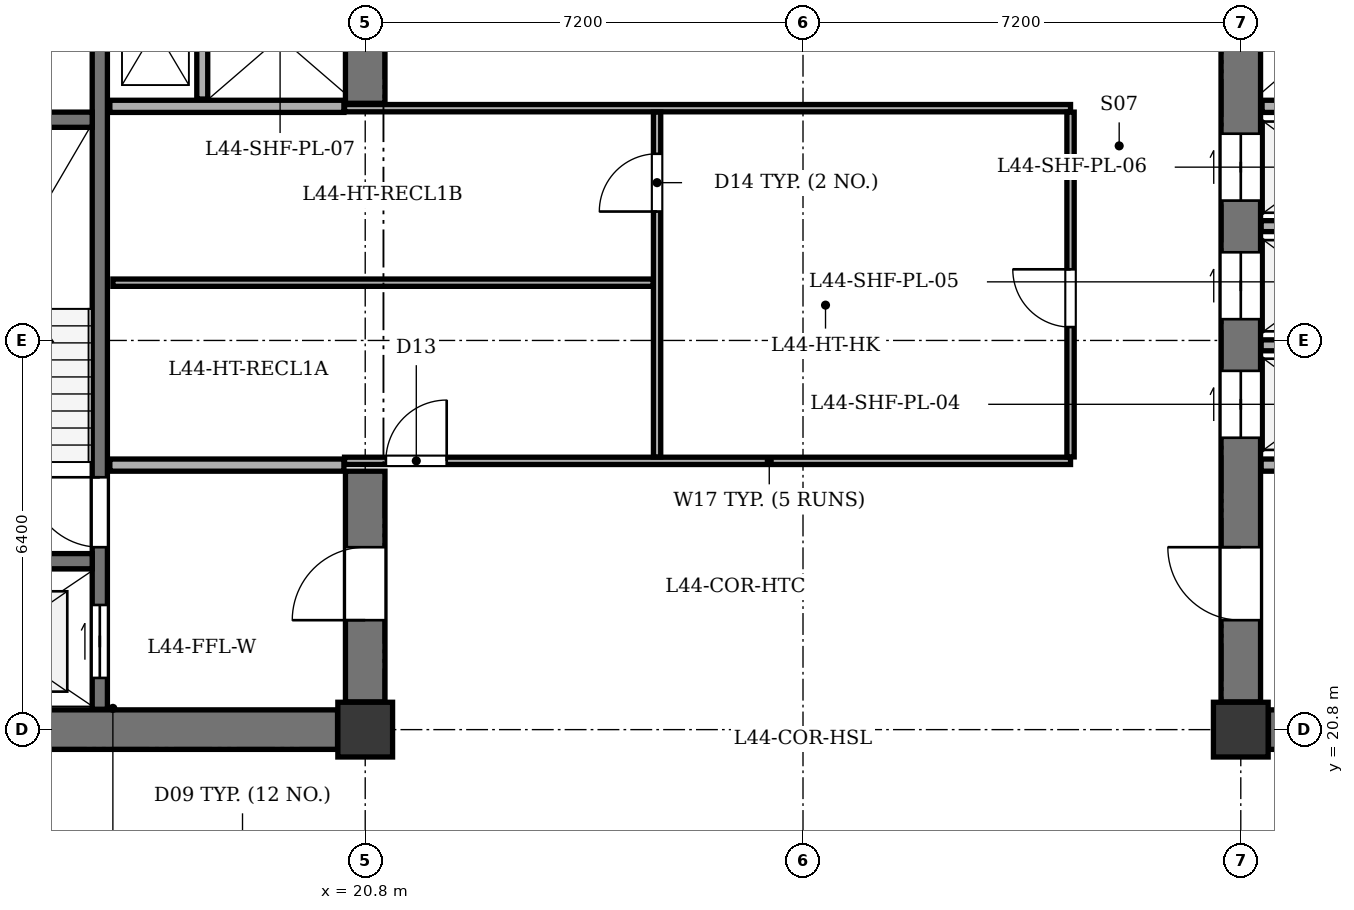
"""IFC4 building model, lengths in metres.
Left out: names, types, materials, properties, quantities, classifications, styles, units other than length and angle.
Written with IfcOpenShell. Run it as: python <this file> out.ifc"""

import sys

from ifc_helpers import new_model, si_unit, direction, frame, frame_2d, origin, origin_2d, place, context, subcontext, project, spatial, rectangle, extrude, element, fill, save


model = new_model("IFC4")
c1 = context("Model", 3, precision=1e-05, world=origin(), true_north=direction((0.0, 1.0)))
c2 = subcontext(c1, "Body", "Model", "MODEL_VIEW")
j1 = project(units=[si_unit("LENGTHUNIT", "METRE"), si_unit("PLANEANGLEUNIT", "RADIAN")], contexts=[c1])
p1 = place(None, origin())
s1 = spatial("IfcSite", under=j1, at=p1, CompositionType="ELEMENT")
p2 = place(p1, origin())
s2 = spatial("IfcBuilding", under=s1, at=p2, CompositionType="ELEMENT")
p3 = place(p2, frame((0.0, 0.0, 172.8)))
s3 = spatial("IfcBuildingStorey", under=s2, at=p3, CompositionType="ELEMENT", Elevation=172.8)
for number, where, z_axis, x_axis in (
    (1, (20.8, 20.8, 0.0), (0.0, 0.0, 1.0), (1.0, 0.0, 0.0)),
    (2, (35.2, 20.8, 0.0), (0.0, 0.0, 1.0), (1.0, 0.0, 0.0)),
):
    element("IfcColumn", number, at=place(p3, frame(where, z_axis=z_axis, x_axis=x_axis)), inside=s3, PredefinedType="COLUMN", context=c2, shape_type="SweptSolid", body=[
        extrude(rectangle(XDim=0.9, YDim=0.9, at=origin_2d()), origin(), (0.0, 0.0, 1.0), 3.5),
    ])
p4 = place(p3, frame((13.255, 20.8, 0.0), z_axis=(0.0, 0.0, 1.0), x_axis=(1.0, 0.0, 0.0)))
e3 = element("IfcWall", 3, at=p4, inside=s3, PredefinedType="SHEAR", context=c2, shape_type="SweptSolid", body=[
    extrude(rectangle(XDim=7.09, YDim=0.65, at=frame_2d((3.545, 0.0))), origin(), (0.0, 0.0, 1.0), 3.2),
])
p5 = place(p3, frame((20.8, 21.255, 0.0), z_axis=(0.0, 0.0, 1.0), x_axis=(0.0, 1.0, 0.0)))
e4 = element("IfcWall", 4, at=p5, inside=s3, PredefinedType="SHEAR", context=c2, shape_type="SweptSolid", body=[
    extrude(rectangle(XDim=3.795, YDim=0.65, at=frame_2d((1.897, 0.0))), origin(), (0.0, 0.0, 1.0), 3.2),
])
p6 = place(p5, frame((1.345, 0.0, 0.0)))
e5 = element("IfcOpeningElement", 5, at=p6, cuts=e4, PredefinedType="OPENING", context=c2, shape_type="SweptSolid", body=[
    extrude(rectangle(XDim=1.2, YDim=2.15, at=frame_2d((0.6, 1.075))), frame((0.0, 0.335, 0.0), z_axis=(0.0, -1.0, 0.0), x_axis=(1.0, 0.0, 0.0)), (0.0, 0.0, 1.0), 0.67),
])
p7 = place(p3, frame((20.8, 31.1, 0.0), z_axis=(0.0, 0.0, 1.0), x_axis=(0.0, 1.0, 0.0)))
e6 = element("IfcWall", 6, at=p7, inside=s3, PredefinedType="SHEAR", context=c2, shape_type="SweptSolid", body=[
    extrude(rectangle(XDim=2.045, YDim=0.65, at=frame_2d((1.022, 0.0))), origin(), (0.0, 0.0, 1.0), 3.2),
])
p8 = place(p3, frame((16.435, 21.135, 0.0), z_axis=(0.0, 0.0, 1.0), x_axis=(0.0, 1.0, 0.0)))
e7 = element("IfcWall", 7, at=p8, inside=s3, PredefinedType="SHEAR", context=c2, shape_type="SweptSolid", body=[
    extrude(rectangle(XDim=12.13, YDim=0.25, at=frame_2d((6.065, 0.0))), origin(), (0.0, 0.0, 1.0), 3.2),
])
p9 = place(p8, frame((0.515, 0.0, 0.0)))
e8 = element("IfcOpeningElement", 8, at=p9, cuts=e7, PredefinedType="OPENING", context=c2, shape_type="SweptSolid", body=[
    extrude(rectangle(XDim=1.2, YDim=2.15, at=frame_2d((0.6, 1.075))), frame((0.0, 0.135, 0.0), z_axis=(0.0, -1.0, 0.0), x_axis=(1.0, 0.0, 0.0)), (0.0, 0.0, 1.0), 0.27),
])
p10 = place(p8, frame((2.665, 0.0, 0.0)))
e9 = element("IfcOpeningElement", 9, at=p10, cuts=e7, PredefinedType="OPENING", context=c2, shape_type="SweptSolid", body=[
    extrude(rectangle(XDim=1.15, YDim=2.15, at=frame_2d((0.575, 1.075))), frame((0.0, 0.135, 0.0), z_axis=(0.0, -1.0, 0.0), x_axis=(1.0, 0.0, 0.0)), (0.0, 0.0, 1.0), 0.27),
])
for number, where, z_axis, x_axis in (
    (10, (13.135, 23.57, 0.0), (0.0, 0.0, 1.0), (1.0, 0.0, 0.0)),
    (11, (13.135, 30.83, 0.0), (0.0, 0.0, 1.0), (1.0, 0.0, 0.0)),
):
    element("IfcWall", number, at=place(p3, frame(where, z_axis=z_axis, x_axis=x_axis)), inside=s3, PredefinedType="SHEAR", context=c2, shape_type="SweptSolid", body=[
        extrude(rectangle(XDim=3.175, YDim=0.25, at=frame_2d((1.587, 0.0))), origin(), (0.0, 0.0, 1.0), 3.2),
    ])
for number, where, z_axis, x_axis in (
    (12, (16.6, 25.15, 0.0), (0.0, 0.0, 1.0), (1.0, 0.0, 0.0)),
    (13, (16.6, 31.05, 0.0), (0.0, 0.0, 1.0), (1.0, 0.0, 0.0)),
):
    element("IfcWall", number, at=place(p3, frame(where, z_axis=z_axis, x_axis=x_axis)), inside=s3, PredefinedType="SOLIDWALL", context=c2, shape_type="SweptSolid", body=[
        extrude(rectangle(XDim=3.85, YDim=0.2, at=frame_2d((1.925, 0.0))), origin(), (0.0, 0.0, 1.0), 3.2),
    ])
p11 = place(p3, frame((18.12, 31.17, 0.0), z_axis=(0.0, 0.0, 1.0), x_axis=(0.0, 1.0, 0.0)))
e14 = element("IfcWall", 14, at=p11, inside=s3, PredefinedType="PARTITIONING", context=c2, shape_type="SweptSolid", body=[
    extrude(rectangle(XDim=2.095, YDim=0.18, at=frame_2d((1.047, 0.0))), origin(), (0.0, 0.0, 1.0), 3.2),
])
p12 = place(p3, frame((35.655, 20.8, 0.0), z_axis=(0.0, 0.0, 1.0), x_axis=(1.0, 0.0, 0.0)))
e15 = element("IfcWall", 15, at=p12, inside=s3, PredefinedType="SHEAR", context=c2, shape_type="SweptSolid", body=[
    extrude(rectangle(XDim=7.09, YDim=0.65, at=frame_2d((3.545, 0.0))), origin(), (0.0, 0.0, 1.0), 3.2),
])
p13 = place(p3, frame((35.2, 21.255, 0.0), z_axis=(0.0, 0.0, 1.0), x_axis=(0.0, 1.0, 0.0)))
e16 = element("IfcWall", 16, at=p13, inside=s3, PredefinedType="SHEAR", context=c2, shape_type="SweptSolid", body=[
    extrude(rectangle(XDim=11.89, YDim=0.65, at=frame_2d((5.945, 0.0))), origin(), (0.0, 0.0, 1.0), 3.2),
])
p14 = place(p13, frame((1.345, 0.0, 0.0)))
e17 = element("IfcOpeningElement", 17, at=p14, cuts=e16, PredefinedType="OPENING", context=c2, shape_type="SweptSolid", body=[
    extrude(rectangle(XDim=1.2, YDim=2.15, at=frame_2d((0.6, 1.075))), frame((0.0, 0.335, 0.0), z_axis=(0.0, -1.0, 0.0), x_axis=(1.0, 0.0, 0.0)), (0.0, 0.0, 1.0), 0.67),
])
p15 = place(p13, frame((4.345, 0.0, 0.0)))
e18 = element("IfcOpeningElement", 18, at=p15, cuts=e16, PredefinedType="OPENING", context=c2, shape_type="SweptSolid", body=[
    extrude(rectangle(XDim=1.1, YDim=2.1, at=frame_2d((0.55, 1.05))), frame((0.0, 0.335, 0.0), z_axis=(0.0, -1.0, 0.0), x_axis=(1.0, 0.0, 0.0)), (0.0, 0.0, 1.0), 0.67),
])
p16 = place(p13, frame((6.295, 0.0, 0.0)))
e19 = element("IfcOpeningElement", 19, at=p16, cuts=e16, PredefinedType="OPENING", context=c2, shape_type="SweptSolid", body=[
    extrude(rectangle(XDim=1.1, YDim=2.1, at=frame_2d((0.55, 1.05))), frame((0.0, 0.335, 0.0), z_axis=(0.0, -1.0, 0.0), x_axis=(1.0, 0.0, 0.0)), (0.0, 0.0, 1.0), 0.67),
])
p17 = place(p13, frame((8.245, 0.0, 0.0)))
e20 = element("IfcOpeningElement", 20, at=p17, cuts=e16, PredefinedType="OPENING", context=c2, shape_type="SweptSolid", body=[
    extrude(rectangle(XDim=1.1, YDim=2.1, at=frame_2d((0.55, 1.05))), frame((0.0, 0.335, 0.0), z_axis=(0.0, -1.0, 0.0), x_axis=(1.0, 0.0, 0.0)), (0.0, 0.0, 1.0), 0.67),
])
p18 = place(p3, frame((35.535, 25.15, 0.0), z_axis=(0.0, 0.0, 1.0), x_axis=(1.0, 0.0, 0.0)))
e21 = element("IfcWall", 21, at=p18, inside=s3, PredefinedType="SOLIDWALL", context=c2, shape_type="SweptSolid", body=[
    extrude(rectangle(XDim=3.865, YDim=0.2, at=frame_2d((1.933, 0.0))), origin(), (0.0, 0.0, 1.0), 3.2),
])
p19 = place(p3, frame((35.55, 31.05, 0.0), z_axis=(0.0, 0.0, 1.0), x_axis=(1.0, 0.0, 0.0)))
e22 = element("IfcWall", 22, at=p19, inside=s3, PredefinedType="SOLIDWALL", context=c2, shape_type="SweptSolid", body=[
    extrude(rectangle(XDim=2.25, YDim=0.2, at=frame_2d((1.125, 0.0))), origin(), (0.0, 0.0, 1.0), 3.2),
])
for number, where, z_axis, x_axis in (
    (23, (35.535, 27.12, 0.0), (0.0, 0.0, 1.0), (1.0, 0.0, 0.0)),
    (24, (35.535, 29.08, 0.0), (0.0, 0.0, 1.0), (1.0, 0.0, 0.0)),
):
    element("IfcWall", number, at=place(p3, frame(where, z_axis=z_axis, x_axis=x_axis)), inside=s3, PredefinedType="PARTITIONING", context=c2, shape_type="SweptSolid", body=[
        extrude(rectangle(XDim=2.245, YDim=0.18, at=frame_2d((1.123, 0.0))), origin(), (0.0, 0.0, 1.0), 3.2),
    ])
p20 = place(p3, frame((20.46, 25.22, 0.0), z_axis=(0.0, 0.0, 1.0), x_axis=(1.0, 0.0, 0.0)))
e25 = element("IfcWall", 25, at=p20, inside=s3, PredefinedType="PARTITIONING", context=c2, shape_type="SweptSolid", body=[
    extrude(rectangle(XDim=11.94, YDim=0.12, at=frame_2d((5.97, 0.0))), origin(), (0.0, 0.0, 1.0), 3.2),
])
p21 = place(p20, frame((0.68, 0.0, 0.0)))
e26 = element("IfcOpeningElement", 26, at=p21, cuts=e25, PredefinedType="OPENING", context=c2, shape_type="SweptSolid", body=[
    extrude(rectangle(XDim=1.0, YDim=2.1, at=frame_2d((0.5, 1.05))), frame((0.0, 0.07, 0.0), z_axis=(0.0, -1.0, 0.0), x_axis=(1.0, 0.0, 0.0)), (0.0, 0.0, 1.0), 0.14),
])
p22 = place(p3, frame((20.46, 31.02, 0.0), z_axis=(0.0, 0.0, 1.0), x_axis=(1.0, 0.0, 0.0)))
e27 = element("IfcWall", 27, at=p22, inside=s3, PredefinedType="PARTITIONING", context=c2, shape_type="SweptSolid", body=[
    extrude(rectangle(XDim=11.94, YDim=0.12, at=frame_2d((5.97, 0.0))), origin(), (0.0, 0.0, 1.0), 3.2),
])
p23 = place(p3, frame((32.4, 25.285, 0.0), z_axis=(0.0, 0.0, 1.0), x_axis=(0.0, 1.0, 0.0)))
e28 = element("IfcWall", 28, at=p23, inside=s3, PredefinedType="PARTITIONING", context=c2, shape_type="SweptSolid", body=[
    extrude(rectangle(XDim=5.67, YDim=0.12, at=frame_2d((2.835, 0.0))), origin(), (0.0, 0.0, 1.0), 3.2),
])
p24 = place(p23, frame((2.135, 0.0, 0.0)))
e29 = element("IfcOpeningElement", 29, at=p24, cuts=e28, PredefinedType="OPENING", context=c2, shape_type="SweptSolid", body=[
    extrude(rectangle(XDim=0.95, YDim=2.1, at=frame_2d((0.475, 1.05))), frame((0.0, 0.07, 0.0), z_axis=(0.0, -1.0, 0.0), x_axis=(1.0, 0.0, 0.0)), (0.0, 0.0, 1.0), 0.14),
])
p25 = place(p3, frame((25.6, 25.285, 0.0), z_axis=(0.0, 0.0, 1.0), x_axis=(0.0, 1.0, 0.0)))
e30 = element("IfcWall", 30, at=p25, inside=s3, PredefinedType="PARTITIONING", context=c2, shape_type="SweptSolid", body=[
    extrude(rectangle(XDim=5.67, YDim=0.12, at=frame_2d((2.835, 0.0))), origin(), (0.0, 0.0, 1.0), 3.2),
])
p26 = place(p25, frame((4.035, 0.0, 0.0)))
e31 = element("IfcOpeningElement", 31, at=p26, cuts=e30, PredefinedType="OPENING", context=c2, shape_type="SweptSolid", body=[
    extrude(rectangle(XDim=0.95, YDim=2.1, at=frame_2d((0.475, 1.05))), frame((0.0, 0.07, 0.0), z_axis=(0.0, -1.0, 0.0), x_axis=(1.0, 0.0, 0.0)), (0.0, 0.0, 1.0), 0.14),
])
p27 = place(p3, frame((16.65, 28.15, 0.0), z_axis=(0.0, 0.0, 1.0), x_axis=(1.0, 0.0, 0.0)))
e32 = element("IfcWall", 32, at=p27, inside=s3, PredefinedType="PARTITIONING", context=c2, shape_type="SweptSolid", body=[
    extrude(rectangle(XDim=8.885, YDim=0.12, at=frame_2d((4.442, 0.0))), origin(), (0.0, 0.0, 1.0), 3.2),
])
p28 = place(p6, origin())
e33 = element("IfcDoor", 33, at=p28, inside=s3, OperationType="SINGLE_SWING_LEFT", PredefinedType="DOOR", context=c2, shape_type="SweptSolid", body=[
    extrude(rectangle(XDim=1.2, YDim=2.15, at=frame_2d((0.6, 1.075))), frame((0.0, 0.025, 0.0), z_axis=(0.0, -1.0, 0.0), x_axis=(1.0, 0.0, 0.0)), (0.0, 0.0, 1.0), 0.05),
])
fill(e5, e33)
p29 = place(p9, origin())
e34 = element("IfcDoor", 34, at=p29, inside=s3, OperationType="DOUBLE_DOOR_SLIDING", PredefinedType="DOOR", context=c2, shape_type="SweptSolid", body=[
    extrude(rectangle(XDim=1.2, YDim=2.15, at=frame_2d((0.6, 1.075))), frame((0.0, 0.025, 0.0), z_axis=(0.0, -1.0, 0.0), x_axis=(1.0, 0.0, 0.0)), (0.0, 0.0, 1.0), 0.05),
])
fill(e8, e34)
p30 = place(p10, origin())
e35 = element("IfcDoor", 35, at=p30, inside=s3, OperationType="SINGLE_SWING_RIGHT", PredefinedType="DOOR", context=c2, shape_type="SweptSolid", body=[
    extrude(rectangle(XDim=1.15, YDim=2.15, at=frame_2d((0.575, 1.075))), frame((0.0, 0.025, 0.0), z_axis=(0.0, -1.0, 0.0), x_axis=(1.0, 0.0, 0.0)), (0.0, 0.0, 1.0), 0.05),
])
fill(e9, e35)
p31 = place(p14, origin())
e36 = element("IfcDoor", 36, at=p31, inside=s3, OperationType="SINGLE_SWING_RIGHT", PredefinedType="DOOR", context=c2, shape_type="SweptSolid", body=[
    extrude(rectangle(XDim=1.2, YDim=2.15, at=frame_2d((0.6, 1.075))), frame((0.0, 0.025, 0.0), z_axis=(0.0, -1.0, 0.0), x_axis=(1.0, 0.0, 0.0)), (0.0, 0.0, 1.0), 0.05),
])
fill(e17, e36)
p32 = place(p15, origin())
e37 = element("IfcDoor", 37, at=p32, inside=s3, OperationType="DOUBLE_DOOR_SLIDING", PredefinedType="DOOR", context=c2, shape_type="SweptSolid", body=[
    extrude(rectangle(XDim=1.1, YDim=2.1, at=frame_2d((0.55, 1.05))), frame((0.0, 0.025, 0.0), z_axis=(0.0, -1.0, 0.0), x_axis=(1.0, 0.0, 0.0)), (0.0, 0.0, 1.0), 0.05),
])
fill(e18, e37)
p33 = place(p16, origin())
e38 = element("IfcDoor", 38, at=p33, inside=s3, OperationType="DOUBLE_DOOR_SLIDING", PredefinedType="DOOR", context=c2, shape_type="SweptSolid", body=[
    extrude(rectangle(XDim=1.1, YDim=2.1, at=frame_2d((0.55, 1.05))), frame((0.0, 0.025, 0.0), z_axis=(0.0, -1.0, 0.0), x_axis=(1.0, 0.0, 0.0)), (0.0, 0.0, 1.0), 0.05),
])
fill(e19, e38)
p34 = place(p17, origin())
e39 = element("IfcDoor", 39, at=p34, inside=s3, OperationType="DOUBLE_DOOR_SLIDING", PredefinedType="DOOR", context=c2, shape_type="SweptSolid", body=[
    extrude(rectangle(XDim=1.1, YDim=2.1, at=frame_2d((0.55, 1.05))), frame((0.0, 0.025, 0.0), z_axis=(0.0, -1.0, 0.0), x_axis=(1.0, 0.0, 0.0)), (0.0, 0.0, 1.0), 0.05),
])
fill(e20, e39)
p35 = place(p21, origin())
e40 = element("IfcDoor", 40, at=p35, inside=s3, OperationType="SINGLE_SWING_RIGHT", PredefinedType="DOOR", context=c2, shape_type="SweptSolid", body=[
    extrude(rectangle(XDim=1.0, YDim=2.1, at=frame_2d((0.5, 1.05))), frame((0.0, 0.025, 0.0), z_axis=(0.0, -1.0, 0.0), x_axis=(1.0, 0.0, 0.0)), (0.0, 0.0, 1.0), 0.05),
])
fill(e26, e40)
p36 = place(p26, origin())
e41 = element("IfcDoor", 41, at=p36, inside=s3, OperationType="SINGLE_SWING_LEFT", PredefinedType="DOOR", context=c2, shape_type="SweptSolid", body=[
    extrude(rectangle(XDim=0.95, YDim=2.1, at=frame_2d((0.475, 1.05))), frame((0.0, 0.025, 0.0), z_axis=(0.0, -1.0, 0.0), x_axis=(1.0, 0.0, 0.0)), (0.0, 0.0, 1.0), 0.05),
])
fill(e31, e41)
p37 = place(p24, origin())
e42 = element("IfcDoor", 42, at=p37, inside=s3, OperationType="SINGLE_SWING_RIGHT", PredefinedType="DOOR", context=c2, shape_type="SweptSolid", body=[
    extrude(rectangle(XDim=0.95, YDim=2.1, at=frame_2d((0.475, 1.05))), frame((0.0, 0.025, 0.0), z_axis=(0.0, -1.0, 0.0), x_axis=(1.0, 0.0, 0.0)), (0.0, 0.0, 1.0), 0.05),
])
fill(e29, e42)
save(model, sys.argv[1])
